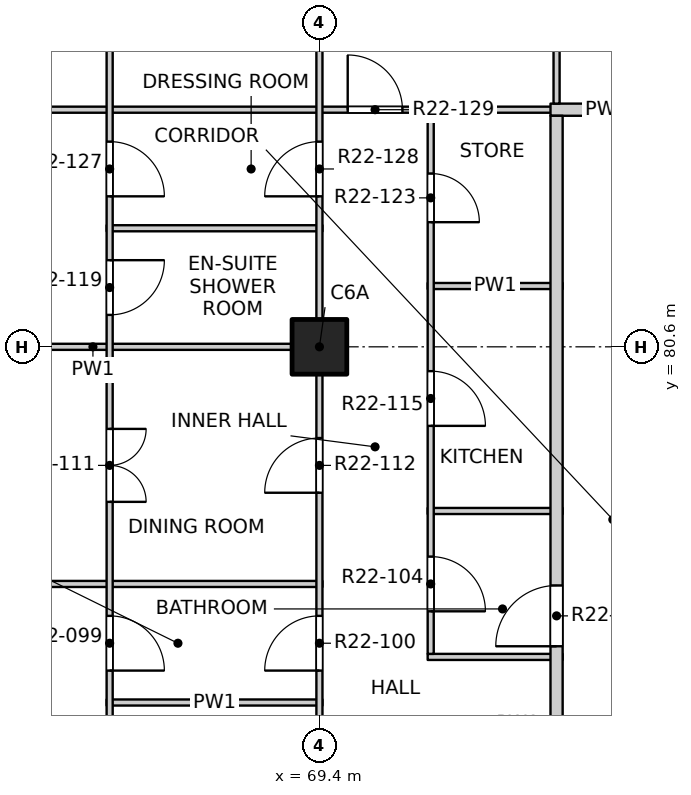
"""IFC4 building model, lengths in metres.
Left out: names, types, materials, properties, quantities, classifications, styles, units other than length and angle.
Written with IfcOpenShell. Run it as: python <this file> out.ifc"""

import sys

from ifc_helpers import new_model, si_unit, direction, frame, frame_2d, origin, origin_2d, place, context, subcontext, project, spatial, rectangle, extrude, element, fill, save


model = new_model("IFC4")
c1 = context("Model", 3, precision=1e-05, world=origin(), true_north=direction((0.0, 1.0)))
c2 = subcontext(c1, "Body", "Model", "MODEL_VIEW")
j1 = project(units=[si_unit("LENGTHUNIT", "METRE"), si_unit("PLANEANGLEUNIT", "RADIAN")], contexts=[c1])
p1 = place(None, origin())
s1 = spatial("IfcSite", under=j1, at=p1, CompositionType="ELEMENT")
p2 = place(p1, origin())
s2 = spatial("IfcBuilding", under=s1, at=p2, CompositionType="ELEMENT")
p3 = place(p2, frame((0.0, 0.0, 231.3)))
s3 = spatial("IfcBuildingStorey", under=s2, at=p3, CompositionType="ELEMENT", Elevation=231.3)
p4 = place(p3, frame((69.4, 80.6, -0.25), z_axis=(0.0, 0.0, 1.0), x_axis=(1.0, 0.0, 0.0)))
e1 = element("IfcColumn", 1, at=p4, inside=s3, PredefinedType="COLUMN", context=c2, shape_type="SweptSolid", body=[
    extrude(rectangle(XDim=0.9, YDim=0.9, at=origin_2d()), origin(), (0.0, 0.0, 1.0), 3.4),
])
p5 = place(p3, frame((65.9, 74.75, 0.0), z_axis=(0.0, 0.0, 1.0), x_axis=(1.0, 0.0, 0.0)))
e2 = element("IfcWall", 2, at=p5, inside=s3, PredefinedType="PARTITIONING", context=c2, shape_type="SweptSolid", body=[
    extrude(rectangle(XDim=3.55, YDim=0.1, at=frame_2d((1.775, 0.0))), origin(), (0.0, 0.0, 1.0), 3.15),
])
p6 = place(p3, frame((71.18, 75.5, 0.0), z_axis=(0.0, 0.0, 1.0), x_axis=(1.0, 0.0, 0.0)))
e3 = element("IfcWall", 3, at=p6, inside=s3, PredefinedType="PARTITIONING", context=c2, shape_type="SweptSolid", body=[
    extrude(rectangle(XDim=2.22, YDim=0.1, at=frame_2d((1.11, 0.0))), origin(), (0.0, 0.0, 1.0), 3.15),
])
p7 = place(p3, frame((61.9, 76.7, 0.0), z_axis=(0.0, 0.0, 1.0), x_axis=(1.0, 0.0, 0.0)))
e4 = element("IfcWall", 4, at=p7, inside=s3, PredefinedType="PARTITIONING", context=c2, shape_type="SweptSolid", body=[
    extrude(rectangle(XDim=7.55, YDim=0.1, at=frame_2d((3.775, 0.0))), origin(), (0.0, 0.0, 1.0), 2.55),
])
p8 = place(p3, frame((71.18, 77.9, 0.0), z_axis=(0.0, 0.0, 1.0), x_axis=(1.0, 0.0, 0.0)))
e5 = element("IfcWall", 5, at=p8, inside=s3, PredefinedType="PARTITIONING", context=c2, shape_type="SweptSolid", body=[
    extrude(rectangle(XDim=2.22, YDim=0.1, at=frame_2d((1.11, 0.0))), origin(), (0.0, 0.0, 1.0), 3.15),
])
p9 = place(p3, frame((61.9, 80.6, 0.0), z_axis=(0.0, 0.0, 1.0), x_axis=(1.0, 0.0, 0.0)))
e6 = element("IfcWall", 6, at=p9, inside=s3, PredefinedType="PARTITIONING", context=c2, shape_type="SweptSolid", body=[
    extrude(rectangle(XDim=7.55, YDim=0.1, at=frame_2d((3.775, 0.0))), origin(), (0.0, 0.0, 1.0), 3.15),
])
p10 = place(p3, frame((71.18, 81.6, 0.0), z_axis=(0.0, 0.0, 1.0), x_axis=(1.0, 0.0, 0.0)))
e7 = element("IfcWall", 7, at=p10, inside=s3, PredefinedType="PARTITIONING", context=c2, shape_type="SweptSolid", body=[
    extrude(rectangle(XDim=2.22, YDim=0.1, at=frame_2d((1.11, 0.0))), origin(), (0.0, 0.0, 1.0), 3.15),
])
p11 = place(p3, frame((65.9, 82.55, 0.0), z_axis=(0.0, 0.0, 1.0), x_axis=(1.0, 0.0, 0.0)))
e8 = element("IfcWall", 8, at=p11, inside=s3, PredefinedType="PARTITIONING", context=c2, shape_type="SweptSolid", body=[
    extrude(rectangle(XDim=3.55, YDim=0.1, at=frame_2d((1.775, 0.0))), origin(), (0.0, 0.0, 1.0), 3.15),
])
p12 = place(p3, frame((61.9, 84.5, 0.0), z_axis=(0.0, 0.0, 1.0), x_axis=(1.0, 0.0, 0.0)))
e9 = element("IfcWall", 9, at=p12, inside=s3, PredefinedType="PARTITIONING", context=c2, shape_type="SweptSolid", body=[
    extrude(rectangle(XDim=11.5, YDim=0.1, at=frame_2d((5.75, 0.0))), origin(), (0.0, 0.0, 1.0), 3.15),
])
p13 = place(p12, frame((7.965, 0.0, 0.0)))
e10 = element("IfcOpeningElement", 10, at=p13, cuts=e9, PredefinedType="OPENING", context=c2, shape_type="SweptSolid", body=[
    extrude(rectangle(XDim=0.9, YDim=2.1, at=frame_2d((0.45, 1.05))), frame((0.0, 0.06, 0.0), z_axis=(0.0, -1.0, 0.0), x_axis=(1.0, 0.0, 0.0)), (0.0, 0.0, 1.0), 0.12),
])
p14 = place(p3, frame((73.2, 84.5, 0.0), z_axis=(0.0, 0.0, 1.0), x_axis=(1.0, 0.0, 0.0)))
e11 = element("IfcWall", 11, at=p14, inside=s3, PredefinedType="PARTITIONING", context=c2, shape_type="SweptSolid", body=[
    extrude(rectangle(XDim=1.85, YDim=0.2, at=frame_2d((0.925, 0.0))), origin(), (0.0, 0.0, 1.0), 3.15),
])
p15 = place(p3, frame((65.95, 72.9, 0.0), z_axis=(0.0, 0.0, 1.0), x_axis=(0.0, 1.0, 0.0)))
e12 = element("IfcWall", 12, at=p15, inside=s3, PredefinedType="PARTITIONING", context=c2, shape_type="SweptSolid", body=[
    extrude(rectangle(XDim=15.2, YDim=0.1, at=frame_2d((7.6, 0.0))), origin(), (0.0, 0.0, 1.0), 3.15),
])
p16 = place(p15, frame((0.425, 0.0, 0.0)))
e13 = element("IfcOpeningElement", 13, at=p16, cuts=e12, PredefinedType="OPENING", context=c2, shape_type="SweptSolid", body=[
    extrude(rectangle(XDim=0.9, YDim=2.1, at=frame_2d((0.45, 1.05))), frame((0.0, 0.06, 0.0), z_axis=(0.0, -1.0, 0.0), x_axis=(1.0, 0.0, 0.0)), (0.0, 0.0, 1.0), 0.12),
])
p17 = place(p15, frame((2.375, 0.0, 0.0)))
e14 = element("IfcOpeningElement", 14, at=p17, cuts=e12, PredefinedType="OPENING", context=c2, shape_type="SweptSolid", body=[
    extrude(rectangle(XDim=0.9, YDim=2.1, at=frame_2d((0.45, 1.05))), frame((0.0, 0.06, 0.0), z_axis=(0.0, -1.0, 0.0), x_axis=(1.0, 0.0, 0.0)), (0.0, 0.0, 1.0), 0.12),
])
p18 = place(p15, frame((5.15, 0.0, 0.0)))
e15 = element("IfcOpeningElement", 15, at=p18, cuts=e12, PredefinedType="OPENING", context=c2, shape_type="SweptSolid", body=[
    extrude(rectangle(XDim=1.2, YDim=2.1, at=frame_2d((0.6, 1.05))), frame((0.0, 0.06, 0.0), z_axis=(0.0, -1.0, 0.0), x_axis=(1.0, 0.0, 0.0)), (0.0, 0.0, 1.0), 0.12),
])
p19 = place(p15, frame((8.225, 0.0, 0.0)))
e16 = element("IfcOpeningElement", 16, at=p19, cuts=e12, PredefinedType="OPENING", context=c2, shape_type="SweptSolid", body=[
    extrude(rectangle(XDim=0.9, YDim=2.1, at=frame_2d((0.45, 1.05))), frame((0.0, 0.06, 0.0), z_axis=(0.0, -1.0, 0.0), x_axis=(1.0, 0.0, 0.0)), (0.0, 0.0, 1.0), 0.12),
])
p20 = place(p15, frame((10.175, 0.0, 0.0)))
e17 = element("IfcOpeningElement", 17, at=p20, cuts=e12, PredefinedType="OPENING", context=c2, shape_type="SweptSolid", body=[
    extrude(rectangle(XDim=0.9, YDim=2.1, at=frame_2d((0.45, 1.05))), frame((0.0, 0.06, 0.0), z_axis=(0.0, -1.0, 0.0), x_axis=(1.0, 0.0, 0.0)), (0.0, 0.0, 1.0), 0.12),
])
p21 = place(p15, frame((12.95, 0.0, 0.0)))
e18 = element("IfcOpeningElement", 18, at=p21, cuts=e12, PredefinedType="OPENING", context=c2, shape_type="SweptSolid", body=[
    extrude(rectangle(XDim=1.2, YDim=2.1, at=frame_2d((0.6, 1.05))), frame((0.0, 0.06, 0.0), z_axis=(0.0, -1.0, 0.0), x_axis=(1.0, 0.0, 0.0)), (0.0, 0.0, 1.0), 0.12),
])
p22 = place(p3, frame((69.4, 41.9, 0.0), z_axis=(0.0, 0.0, 1.0), x_axis=(0.0, 1.0, 0.0)))
e19 = element("IfcWall", 19, at=p22, inside=s3, PredefinedType="PARTITIONING", context=c2, shape_type="SweptSolid", body=[
    extrude(rectangle(XDim=46.2, YDim=0.1, at=frame_2d((23.1, 0.0))), origin(), (0.0, 0.0, 1.0), 3.15),
])
p23 = place(p22, frame((1.2, 0.0, 0.0)))
e20 = element("IfcOpeningElement", 20, at=p23, cuts=e19, PredefinedType="OPENING", context=c2, shape_type="SweptSolid", body=[
    extrude(rectangle(XDim=0.9, YDim=2.1, at=frame_2d((0.45, 1.05))), frame((0.0, 0.06, 0.0), z_axis=(0.0, -1.0, 0.0), x_axis=(1.0, 0.0, 0.0)), (0.0, 0.0, 1.0), 0.12),
])
p24 = place(p22, frame((5.1, 0.0, 0.0)))
e21 = element("IfcOpeningElement", 21, at=p24, cuts=e19, PredefinedType="OPENING", context=c2, shape_type="SweptSolid", body=[
    extrude(rectangle(XDim=0.9, YDim=2.1, at=frame_2d((0.45, 1.05))), frame((0.0, 0.06, 0.0), z_axis=(0.0, -1.0, 0.0), x_axis=(1.0, 0.0, 0.0)), (0.0, 0.0, 1.0), 0.12),
])
p25 = place(p22, frame((9.0, 0.0, 0.0)))
e22 = element("IfcOpeningElement", 22, at=p25, cuts=e19, PredefinedType="OPENING", context=c2, shape_type="SweptSolid", body=[
    extrude(rectangle(XDim=0.9, YDim=2.1, at=frame_2d((0.45, 1.05))), frame((0.0, 0.06, 0.0), z_axis=(0.0, -1.0, 0.0), x_axis=(1.0, 0.0, 0.0)), (0.0, 0.0, 1.0), 0.12),
])
p26 = place(p22, frame((13.85, 0.0, 0.0)))
e23 = element("IfcOpeningElement", 23, at=p26, cuts=e19, PredefinedType="OPENING", context=c2, shape_type="SweptSolid", body=[
    extrude(rectangle(XDim=0.9, YDim=2.1, at=frame_2d((0.45, 1.05))), frame((0.0, 0.06, 0.0), z_axis=(0.0, -1.0, 0.0), x_axis=(1.0, 0.0, 0.0)), (0.0, 0.0, 1.0), 0.12),
])
p27 = place(p22, frame((17.775, 0.0, 0.0)))
e24 = element("IfcOpeningElement", 24, at=p27, cuts=e19, PredefinedType="OPENING", context=c2, shape_type="SweptSolid", body=[
    extrude(rectangle(XDim=0.9, YDim=2.1, at=frame_2d((0.45, 1.05))), frame((0.0, 0.06, 0.0), z_axis=(0.0, -1.0, 0.0), x_axis=(1.0, 0.0, 0.0)), (0.0, 0.0, 1.0), 0.12),
])
p28 = place(p22, frame((21.625, 0.0, 0.0)))
e25 = element("IfcOpeningElement", 25, at=p28, cuts=e19, PredefinedType="OPENING", context=c2, shape_type="SweptSolid", body=[
    extrude(rectangle(XDim=0.9, YDim=2.1, at=frame_2d((0.45, 1.05))), frame((0.0, 0.06, 0.0), z_axis=(0.0, -1.0, 0.0), x_axis=(1.0, 0.0, 0.0)), (0.0, 0.0, 1.0), 0.12),
])
p29 = place(p22, frame((24.6, 0.0, 0.0)))
e26 = element("IfcOpeningElement", 26, at=p29, cuts=e19, PredefinedType="OPENING", context=c2, shape_type="SweptSolid", body=[
    extrude(rectangle(XDim=0.9, YDim=2.1, at=frame_2d((0.45, 1.05))), frame((0.0, 0.06, 0.0), z_axis=(0.0, -1.0, 0.0), x_axis=(1.0, 0.0, 0.0)), (0.0, 0.0, 1.0), 0.12),
])
p30 = place(p22, frame((29.425, 0.0, 0.0)))
e27 = element("IfcOpeningElement", 27, at=p30, cuts=e19, PredefinedType="OPENING", context=c2, shape_type="SweptSolid", body=[
    extrude(rectangle(XDim=0.9, YDim=2.1, at=frame_2d((0.45, 1.05))), frame((0.0, 0.06, 0.0), z_axis=(0.0, -1.0, 0.0), x_axis=(1.0, 0.0, 0.0)), (0.0, 0.0, 1.0), 0.12),
])
p31 = place(p22, frame((33.375, 0.0, 0.0)))
e28 = element("IfcOpeningElement", 28, at=p31, cuts=e19, PredefinedType="OPENING", context=c2, shape_type="SweptSolid", body=[
    extrude(rectangle(XDim=0.9, YDim=2.1, at=frame_2d((0.45, 1.05))), frame((0.0, 0.06, 0.0), z_axis=(0.0, -1.0, 0.0), x_axis=(1.0, 0.0, 0.0)), (0.0, 0.0, 1.0), 0.12),
])
p32 = place(p22, frame((36.3, 0.0, 0.0)))
e29 = element("IfcOpeningElement", 29, at=p32, cuts=e19, PredefinedType="OPENING", context=c2, shape_type="SweptSolid", body=[
    extrude(rectangle(XDim=0.9, YDim=2.1, at=frame_2d((0.45, 1.05))), frame((0.0, 0.06, 0.0), z_axis=(0.0, -1.0, 0.0), x_axis=(1.0, 0.0, 0.0)), (0.0, 0.0, 1.0), 0.12),
])
p33 = place(p22, frame((41.175, 0.0, 0.0)))
e30 = element("IfcOpeningElement", 30, at=p33, cuts=e19, PredefinedType="OPENING", context=c2, shape_type="SweptSolid", body=[
    extrude(rectangle(XDim=0.9, YDim=2.1, at=frame_2d((0.45, 1.05))), frame((0.0, 0.06, 0.0), z_axis=(0.0, -1.0, 0.0), x_axis=(1.0, 0.0, 0.0)), (0.0, 0.0, 1.0), 0.12),
])
p34 = place(p22, frame((44.1, 0.0, 0.0)))
e31 = element("IfcOpeningElement", 31, at=p34, cuts=e19, PredefinedType="OPENING", context=c2, shape_type="SweptSolid", body=[
    extrude(rectangle(XDim=0.9, YDim=2.1, at=frame_2d((0.45, 1.05))), frame((0.0, 0.06, 0.0), z_axis=(0.0, -1.0, 0.0), x_axis=(1.0, 0.0, 0.0)), (0.0, 0.0, 1.0), 0.12),
])
p35 = place(p3, frame((71.23, 75.55, 0.0), z_axis=(0.0, 0.0, 1.0), x_axis=(0.0, 1.0, 0.0)))
e32 = element("IfcWall", 32, at=p35, inside=s3, PredefinedType="PARTITIONING", context=c2, shape_type="SweptSolid", body=[
    extrude(rectangle(XDim=8.9, YDim=0.1, at=frame_2d((4.45, 0.0))), origin(), (0.0, 0.0, 1.0), 3.15),
])
p36 = place(p35, frame((0.7, 0.0, 0.0)))
e33 = element("IfcOpeningElement", 33, at=p36, cuts=e32, PredefinedType="OPENING", context=c2, shape_type="SweptSolid", body=[
    extrude(rectangle(XDim=0.9, YDim=2.1, at=frame_2d((0.45, 1.05))), frame((0.0, 0.06, 0.0), z_axis=(0.0, -1.0, 0.0), x_axis=(1.0, 0.0, 0.0)), (0.0, 0.0, 1.0), 0.12),
])
p37 = place(p35, frame((3.75, 0.0, 0.0)))
e34 = element("IfcOpeningElement", 34, at=p37, cuts=e32, PredefinedType="OPENING", context=c2, shape_type="SweptSolid", body=[
    extrude(rectangle(XDim=0.9, YDim=2.1, at=frame_2d((0.45, 1.05))), frame((0.0, 0.06, 0.0), z_axis=(0.0, -1.0, 0.0), x_axis=(1.0, 0.0, 0.0)), (0.0, 0.0, 1.0), 0.12),
])
p38 = place(p35, frame((7.1, 0.0, 0.0)))
e35 = element("IfcOpeningElement", 35, at=p38, cuts=e32, PredefinedType="OPENING", context=c2, shape_type="SweptSolid", body=[
    extrude(rectangle(XDim=0.8, YDim=2.1, at=frame_2d((0.4, 1.05))), frame((0.0, 0.06, 0.0), z_axis=(0.0, -1.0, 0.0), x_axis=(1.0, 0.0, 0.0)), (0.0, 0.0, 1.0), 0.12),
])
p39 = place(p3, frame((73.3, 49.5, 0.0), z_axis=(0.0, 0.0, 1.0), x_axis=(0.0, 1.0, 0.0)))
e36 = element("IfcWall", 36, at=p39, inside=s3, PredefinedType="PARTITIONING", context=c2, shape_type="SweptSolid", body=[
    extrude(rectangle(XDim=34.9, YDim=0.2, at=frame_2d((17.45, 0.0))), origin(), (0.0, 0.0, 1.0), 3.15),
])
p40 = place(p39, frame((3.575, 0.0, 0.0)))
e37 = element("IfcOpeningElement", 37, at=p40, cuts=e36, PredefinedType="OPENING", context=c2, shape_type="SweptSolid", body=[
    extrude(rectangle(XDim=1.0, YDim=2.1, at=frame_2d((0.5, 1.05))), frame((0.0, 0.11, 0.0), z_axis=(0.0, -1.0, 0.0), x_axis=(1.0, 0.0, 0.0)), (0.0, 0.0, 1.0), 0.22),
])
p41 = place(p39, frame((18.075, 0.0, 0.0)))
e38 = element("IfcOpeningElement", 38, at=p41, cuts=e36, PredefinedType="OPENING", context=c2, shape_type="SweptSolid", body=[
    extrude(rectangle(XDim=1.0, YDim=2.1, at=frame_2d((0.5, 1.05))), frame((0.0, 0.11, 0.0), z_axis=(0.0, -1.0, 0.0), x_axis=(1.0, 0.0, 0.0)), (0.0, 0.0, 1.0), 0.22),
])
p42 = place(p39, frame((26.175, 0.0, 0.0)))
e39 = element("IfcOpeningElement", 39, at=p42, cuts=e36, PredefinedType="OPENING", context=c2, shape_type="SweptSolid", body=[
    extrude(rectangle(XDim=1.0, YDim=2.1, at=frame_2d((0.5, 1.05))), frame((0.0, 0.11, 0.0), z_axis=(0.0, -1.0, 0.0), x_axis=(1.0, 0.0, 0.0)), (0.0, 0.0, 1.0), 0.22),
])
p43 = place(p3, frame((73.3, 84.6, 0.0), z_axis=(0.0, 0.0, 1.0), x_axis=(0.0, 1.0, 0.0)))
e40 = element("IfcWall", 40, at=p43, inside=s3, PredefinedType="PARTITIONING", context=c2, shape_type="SweptSolid", body=[
    extrude(rectangle(XDim=3.5, YDim=0.1, at=frame_2d((1.75, 0.0))), origin(), (0.0, 0.0, 1.0), 3.15),
])
p44 = place(p43, frame((1.4, 0.0, 0.0)))
e41 = element("IfcOpeningElement", 41, at=p44, cuts=e40, PredefinedType="OPENING", context=c2, shape_type="SweptSolid", body=[
    extrude(rectangle(XDim=0.9, YDim=2.1, at=frame_2d((0.45, 1.05))), frame((0.0, 0.06, 0.0), z_axis=(0.0, -1.0, 0.0), x_axis=(1.0, 0.0, 0.0)), (0.0, 0.0, 1.0), 0.12),
])
p45 = place(p17, origin())
e42 = element("IfcDoor", 42, at=p45, inside=s3, OperationType="SINGLE_SWING_RIGHT", PredefinedType="DOOR", context=c2, shape_type="SweptSolid", body=[
    extrude(rectangle(XDim=0.9, YDim=2.1, at=frame_2d((0.45, 1.05))), frame((0.0, 0.025, 0.0), z_axis=(0.0, -1.0, 0.0), x_axis=(1.0, 0.0, 0.0)), (0.0, 0.0, 1.0), 0.05),
])
fill(e14, e42)
p46 = place(p31, origin())
e43 = element("IfcDoor", 43, at=p46, inside=s3, OperationType="SINGLE_SWING_LEFT", PredefinedType="DOOR", context=c2, shape_type="SweptSolid", body=[
    extrude(rectangle(XDim=0.9, YDim=2.1, at=frame_2d((0.45, 1.05))), frame((0.0, 0.025, 0.0), z_axis=(0.0, -1.0, 0.0), x_axis=(1.0, 0.0, 0.0)), (0.0, 0.0, 1.0), 0.05),
])
fill(e28, e43)
p47 = place(p42, origin())
e44 = element("IfcDoor", 44, at=p47, inside=s3, OperationType="SINGLE_SWING_RIGHT", PredefinedType="DOOR", context=c2, shape_type="SweptSolid", body=[
    extrude(rectangle(XDim=1.0, YDim=2.1, at=frame_2d((0.5, 1.05))), frame((0.0, 0.025, 0.0), z_axis=(0.0, -1.0, 0.0), x_axis=(1.0, 0.0, 0.0)), (0.0, 0.0, 1.0), 0.05),
])
fill(e39, e44)
p48 = place(p36, origin())
e45 = element("IfcDoor", 45, at=p48, inside=s3, OperationType="SINGLE_SWING_RIGHT", PredefinedType="DOOR", context=c2, shape_type="SweptSolid", body=[
    extrude(rectangle(XDim=0.9, YDim=2.1, at=frame_2d((0.45, 1.05))), frame((0.0, 0.025, 0.0), z_axis=(0.0, -1.0, 0.0), x_axis=(1.0, 0.0, 0.0)), (0.0, 0.0, 1.0), 0.05),
])
fill(e33, e45)
p49 = place(p18, origin())
e46 = element("IfcDoor", 46, at=p49, inside=s3, OperationType="DOUBLE_DOOR_SINGLE_SWING", PredefinedType="DOOR", context=c2, shape_type="SweptSolid", body=[
    extrude(rectangle(XDim=1.2, YDim=2.1, at=frame_2d((0.6, 1.05))), frame((0.0, 0.025, 0.0), z_axis=(0.0, -1.0, 0.0), x_axis=(1.0, 0.0, 0.0)), (0.0, 0.0, 1.0), 0.05),
])
fill(e15, e46)
p50 = place(p32, origin())
e47 = element("IfcDoor", 47, at=p50, inside=s3, OperationType="SINGLE_SWING_LEFT", PredefinedType="DOOR", context=c2, shape_type="SweptSolid", body=[
    extrude(rectangle(XDim=0.9, YDim=2.1, at=frame_2d((0.45, 1.05))), frame((0.0, 0.025, 0.0), z_axis=(0.0, -1.0, 0.0), x_axis=(1.0, 0.0, 0.0)), (0.0, 0.0, 1.0), 0.05),
])
fill(e29, e47)
p51 = place(p37, origin())
e48 = element("IfcDoor", 48, at=p51, inside=s3, OperationType="SINGLE_SWING_RIGHT", PredefinedType="DOOR", context=c2, shape_type="SweptSolid", body=[
    extrude(rectangle(XDim=0.9, YDim=2.1, at=frame_2d((0.45, 1.05))), frame((0.0, 0.025, 0.0), z_axis=(0.0, -1.0, 0.0), x_axis=(1.0, 0.0, 0.0)), (0.0, 0.0, 1.0), 0.05),
])
fill(e34, e48)
p52 = place(p19, origin())
e49 = element("IfcDoor", 49, at=p52, inside=s3, OperationType="SINGLE_SWING_LEFT", PredefinedType="DOOR", context=c2, shape_type="SweptSolid", body=[
    extrude(rectangle(XDim=0.9, YDim=2.1, at=frame_2d((0.45, 1.05))), frame((0.0, 0.025, 0.0), z_axis=(0.0, -1.0, 0.0), x_axis=(1.0, 0.0, 0.0)), (0.0, 0.0, 1.0), 0.05),
])
fill(e16, e49)
p53 = place(p38, origin())
e50 = element("IfcDoor", 50, at=p53, inside=s3, OperationType="SINGLE_SWING_RIGHT", PredefinedType="DOOR", context=c2, shape_type="SweptSolid", body=[
    extrude(rectangle(XDim=0.8, YDim=2.1, at=frame_2d((0.4, 1.05))), frame((0.0, 0.025, 0.0), z_axis=(0.0, -1.0, 0.0), x_axis=(1.0, 0.0, 0.0)), (0.0, 0.0, 1.0), 0.05),
])
fill(e35, e50)
p54 = place(p20, origin())
e51 = element("IfcDoor", 51, at=p54, inside=s3, OperationType="SINGLE_SWING_RIGHT", PredefinedType="DOOR", context=c2, shape_type="SweptSolid", body=[
    extrude(rectangle(XDim=0.9, YDim=2.1, at=frame_2d((0.45, 1.05))), frame((0.0, 0.025, 0.0), z_axis=(0.0, -1.0, 0.0), x_axis=(1.0, 0.0, 0.0)), (0.0, 0.0, 1.0), 0.05),
])
fill(e17, e51)
p55 = place(p33, origin())
e52 = element("IfcDoor", 52, at=p55, inside=s3, OperationType="SINGLE_SWING_LEFT", PredefinedType="DOOR", context=c2, shape_type="SweptSolid", body=[
    extrude(rectangle(XDim=0.9, YDim=2.1, at=frame_2d((0.45, 1.05))), frame((0.0, 0.025, 0.0), z_axis=(0.0, -1.0, 0.0), x_axis=(1.0, 0.0, 0.0)), (0.0, 0.0, 1.0), 0.05),
])
fill(e30, e52)
p56 = place(p13, origin())
e53 = element("IfcDoor", 53, at=p56, inside=s3, OperationType="SINGLE_SWING_LEFT", PredefinedType="DOOR", context=c2, shape_type="SweptSolid", body=[
    extrude(rectangle(XDim=0.9, YDim=2.1, at=frame_2d((0.45, 1.05))), frame((0.0, 0.025, 0.0), z_axis=(0.0, -1.0, 0.0), x_axis=(1.0, 0.0, 0.0)), (0.0, 0.0, 1.0), 0.05),
])
fill(e10, e53)
save(model, sys.argv[1])
